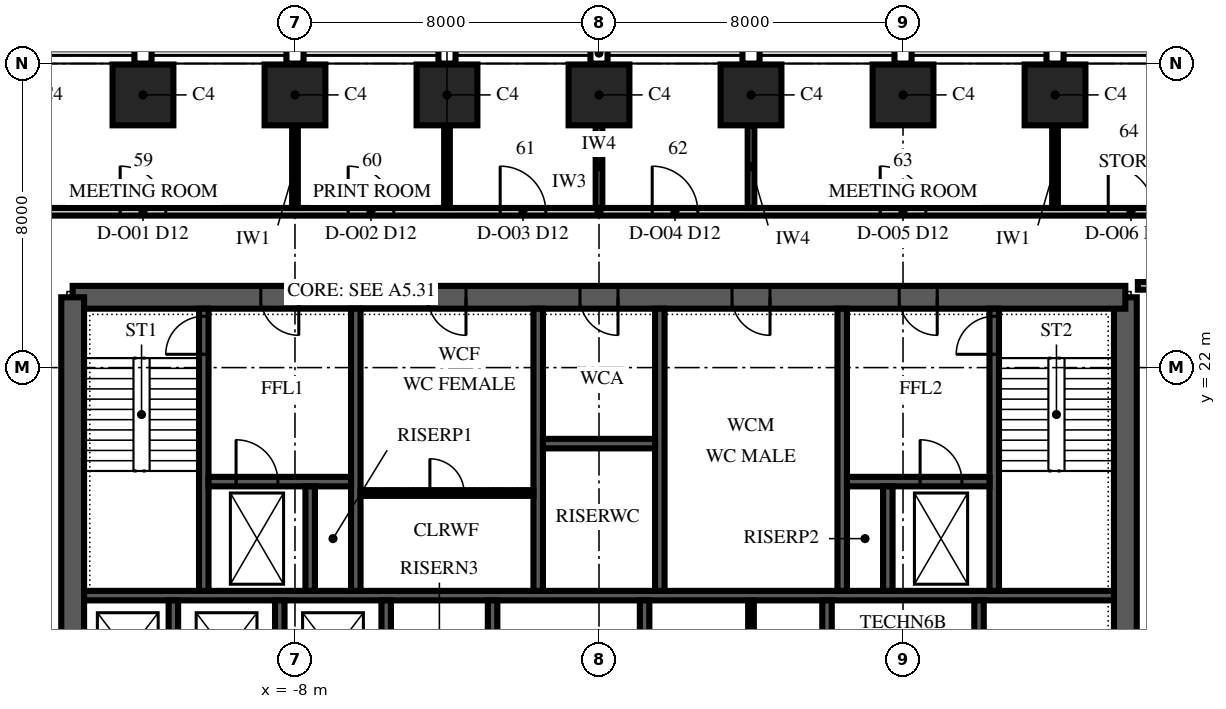
"""IFC4 building model, lengths in metres.
Left out: names, types, materials, properties, quantities, classifications, styles, units other than length and angle.
Written with IfcOpenShell. Run it as: python <this file> out.ifc"""

import sys

from ifc_helpers import new_model, si_unit, direction, frame, frame_2d, origin, origin_2d, place, context, subcontext, project, spatial, polyline, rectangle, outline, extrude, element, fill, save


model = new_model("IFC4")
c1 = context("Model", 3, precision=1e-05, world=origin(), true_north=direction((0.0, 1.0)))
c2 = subcontext(c1, "Body", "Model", "MODEL_VIEW")
j1 = project(units=[si_unit("LENGTHUNIT", "METRE"), si_unit("PLANEANGLEUNIT", "RADIAN")], contexts=[c1])
p1 = place(None, origin())
s1 = spatial("IfcSite", under=j1, at=p1, CompositionType="ELEMENT")
p2 = place(p1, origin())
s2 = spatial("IfcBuilding", under=s1, at=p2, CompositionType="ELEMENT")
p3 = place(p2, frame((0.0, 0.0, 226.0)))
s3 = spatial("IfcBuildingStorey", under=s2, at=p3, CompositionType="ELEMENT", Elevation=226.0)
for number, where, z_axis, x_axis in (
    (1, (12.0, 29.175, 0.0), (0.0, 0.0, 1.0), (-1.0, 0.0, 0.0)),
    (2, (8.0, 29.175, 0.0), (0.0, 0.0, 1.0), (-1.0, 0.0, 0.0)),
    (3, (4.0, 29.175, 0.0), (0.0, 0.0, 1.0), (-1.0, 0.0, 0.0)),
    (4, (0.0, 29.175, 0.0), (0.0, 0.0, 1.0), (-1.0, 0.0, 0.0)),
    (5, (-4.0, 29.175, 0.0), (0.0, 0.0, 1.0), (-1.0, 0.0, 0.0)),
    (6, (-8.0, 29.175, 0.0), (0.0, 0.0, 1.0), (-1.0, 0.0, 0.0)),
    (7, (-12.0, 29.175, 0.0), (0.0, 0.0, 1.0), (-1.0, 0.0, 0.0)),
):
    element("IfcColumn", number, at=place(p3, frame(where, z_axis=z_axis, x_axis=x_axis)), inside=s3, PredefinedType="COLUMN", context=c2, shape_type="SweptSolid", body=[
        extrude(rectangle(XDim=1.6, YDim=1.6, at=origin_2d()), origin(), (0.0, 0.0, 1.0), 4.0),
    ])
p4 = place(p3, frame((13.85, 6.15, 0.0), z_axis=(0.0, 0.0, 1.0), x_axis=(0.0, 1.0, 0.0)))
e8 = element("IfcWall", 8, at=p4, inside=s3, PredefinedType="SHEAR", context=c2, shape_type="SweptSolid", body=[
    extrude(outline(polyline([(0.0, -0.3), (17.7, -0.3), (17.7, 0.0), (17.4, 0.0), (17.4, 0.3), (0.3, 0.3), (0.3, 0.0), (0.0, 0.0), (0.0, -0.3)])), origin(), (0.0, 0.0, 1.0), 4.0),
])
p5 = place(p4, frame((4.15, 0.0, 0.0)))
e9 = element("IfcOpeningElement", 9, at=p5, cuts=e8, PredefinedType="OPENING", context=c2, shape_type="SweptSolid", body=[
    extrude(rectangle(XDim=1.8, YDim=2.4, at=frame_2d((0.9, 1.2))), frame((0.0, 0.315, 0.0), z_axis=(0.0, -1.0, 0.0), x_axis=(1.0, 0.0, 0.0)), (0.0, 0.0, 1.0), 0.63),
])
p6 = place(p3, frame((13.85, 23.85, 0.0), z_axis=(0.0, 0.0, 1.0), x_axis=(-1.0, 0.0, 0.0)))
e10 = element("IfcWall", 10, at=p6, inside=s3, PredefinedType="SHEAR", context=c2, shape_type="SweptSolid", body=[
    extrude(rectangle(XDim=27.7, YDim=0.6, at=frame_2d((13.85, 0.0))), origin(), (0.0, 0.0, 1.0), 4.0),
])
p7 = place(p6, frame((21.75, 0.0, 0.0)))
e11 = element("IfcOpeningElement", 11, at=p7, cuts=e10, PredefinedType="OPENING", context=c2, shape_type="SweptSolid", body=[
    extrude(rectangle(XDim=1.0, YDim=2.1, at=frame_2d((0.5, 1.05))), frame((0.0, 0.315, 0.0), z_axis=(0.0, -1.0, 0.0), x_axis=(1.0, 0.0, 0.0)), (0.0, 0.0, 1.0), 0.63),
])
p8 = place(p6, frame((4.95, 0.0, 0.0)))
e12 = element("IfcOpeningElement", 12, at=p8, cuts=e10, PredefinedType="OPENING", context=c2, shape_type="SweptSolid", body=[
    extrude(rectangle(XDim=1.0, YDim=2.1, at=frame_2d((0.5, 1.05))), frame((0.0, 0.315, 0.0), z_axis=(0.0, -1.0, 0.0), x_axis=(1.0, 0.0, 0.0)), (0.0, 0.0, 1.0), 0.63),
])
p9 = place(p6, frame((17.35, 0.0, 0.0)))
e13 = element("IfcOpeningElement", 13, at=p9, cuts=e10, PredefinedType="OPENING", context=c2, shape_type="SweptSolid", body=[
    extrude(rectangle(XDim=1.0, YDim=2.1, at=frame_2d((0.5, 1.05))), frame((0.0, 0.315, 0.0), z_axis=(0.0, -1.0, 0.0), x_axis=(1.0, 0.0, 0.0)), (0.0, 0.0, 1.0), 0.63),
])
p10 = place(p6, frame((13.35, 0.0, 0.0)))
e14 = element("IfcOpeningElement", 14, at=p10, cuts=e10, PredefinedType="OPENING", context=c2, shape_type="SweptSolid", body=[
    extrude(rectangle(XDim=1.0, YDim=2.1, at=frame_2d((0.5, 1.05))), frame((0.0, 0.315, 0.0), z_axis=(0.0, -1.0, 0.0), x_axis=(1.0, 0.0, 0.0)), (0.0, 0.0, 1.0), 0.63),
])
p11 = place(p6, frame((9.35, 0.0, 0.0)))
e15 = element("IfcOpeningElement", 15, at=p11, cuts=e10, PredefinedType="OPENING", context=c2, shape_type="SweptSolid", body=[
    extrude(rectangle(XDim=1.0, YDim=2.1, at=frame_2d((0.5, 1.05))), frame((0.0, 0.315, 0.0), z_axis=(0.0, -1.0, 0.0), x_axis=(1.0, 0.0, 0.0)), (0.0, 0.0, 1.0), 0.63),
])
p12 = place(p3, frame((-13.85, 23.85, 0.0), z_axis=(0.0, 0.0, 1.0), x_axis=(0.0, -1.0, 0.0)))
e16 = element("IfcWall", 16, at=p12, inside=s3, PredefinedType="SHEAR", context=c2, shape_type="SweptSolid", body=[
    extrude(outline(polyline([(0.0, -0.3), (17.7, -0.3), (17.7, 0.0), (17.4, 0.0), (17.4, 0.3), (0.3, 0.3), (0.3, 0.0), (0.0, 0.0), (0.0, -0.3)])), origin(), (0.0, 0.0, 1.0), 4.0),
])
p13 = place(p12, frame((11.75, 0.0, 0.0)))
e17 = element("IfcOpeningElement", 17, at=p13, cuts=e16, PredefinedType="OPENING", context=c2, shape_type="SweptSolid", body=[
    extrude(rectangle(XDim=1.8, YDim=2.4, at=frame_2d((0.9, 1.2))), frame((0.0, 0.315, 0.0), z_axis=(0.0, -1.0, 0.0), x_axis=(1.0, 0.0, 0.0)), (0.0, 0.0, 1.0), 0.63),
])
p14 = place(p3, frame((-13.55, 16.0, 0.0), z_axis=(0.0, 0.0, 1.0), x_axis=(1.0, 0.0, 0.0)))
e18 = element("IfcWall", 18, at=p14, inside=s3, PredefinedType="SHEAR", context=c2, shape_type="SweptSolid", body=[
    extrude(rectangle(XDim=27.1, YDim=0.25, at=frame_2d((13.55, 0.0))), origin(), (0.0, 0.0, 1.0), 4.0),
])
for number, where, z_axis, x_axis in (
    (19, (-11.2, 13.125, 0.0), (0.0, 0.0, 1.0), (0.0, 1.0, 0.0)),
    (20, (-8.4, 13.125, 0.0), (0.0, 0.0, 1.0), (0.0, 1.0, 0.0)),
    (21, (-5.6, 13.125, 0.0), (0.0, 0.0, 1.0), (0.0, 1.0, 0.0)),
    (22, (-2.8, 13.125, 0.0), (0.0, 0.0, 1.0), (0.0, 1.0, 0.0)),
    (23, (1.2, 13.125, 0.0), (0.0, 0.0, 1.0), (0.0, 1.0, 0.0)),
    (24, (6.0, 13.125, 0.0), (0.0, 0.0, 1.0), (0.0, 1.0, 0.0)),
    (25, (10.0, 13.125, 0.0), (0.0, 0.0, 1.0), (0.0, 1.0, 0.0)),
):
    element("IfcWall", number, at=place(p3, frame(where, z_axis=z_axis, x_axis=x_axis)), inside=s3, PredefinedType="SHEAR", context=c2, shape_type="SweptSolid", body=[
        extrude(rectangle(XDim=2.75, YDim=0.25, at=frame_2d((1.375, 0.0))), origin(), (0.0, 0.0, 1.0), 4.0),
    ])
p15 = place(p3, frame((-10.4, 16.125, 0.0), z_axis=(0.0, 0.0, 1.0), x_axis=(0.0, 1.0, 0.0)))
e26 = element("IfcWall", 26, at=p15, inside=s3, PredefinedType="SHEAR", context=c2, shape_type="SweptSolid", body=[
    extrude(rectangle(XDim=7.425, YDim=0.25, at=frame_2d((3.712, 0.0))), origin(), (0.0, 0.0, 1.0), 4.0),
])
p16 = place(p15, frame((6.225, 0.0, 0.0)))
e27 = element("IfcOpeningElement", 27, at=p16, cuts=e26, PredefinedType="OPENING", context=c2, shape_type="SweptSolid", body=[
    extrude(rectangle(XDim=1.0, YDim=2.1, at=frame_2d((0.5, 1.05))), frame((0.0, 0.14, 0.0), z_axis=(0.0, -1.0, 0.0), x_axis=(1.0, 0.0, 0.0)), (0.0, 0.0, 1.0), 0.28),
])
for number, where, z_axis, x_axis in (
    (28, (-6.4, 16.125, 0.0), (0.0, 0.0, 1.0), (0.0, 1.0, 0.0)),
    (29, (-1.6, 16.125, 0.0), (0.0, 0.0, 1.0), (0.0, 1.0, 0.0)),
    (30, (1.6, 16.125, 0.0), (0.0, 0.0, 1.0), (0.0, 1.0, 0.0)),
    (31, (6.4, 16.125, 0.0), (0.0, 0.0, 1.0), (0.0, 1.0, 0.0)),
):
    element("IfcWall", number, at=place(p3, frame(where, z_axis=z_axis, x_axis=x_axis)), inside=s3, PredefinedType="SHEAR", context=c2, shape_type="SweptSolid", body=[
        extrude(rectangle(XDim=7.425, YDim=0.25, at=frame_2d((3.712, 0.0))), origin(), (0.0, 0.0, 1.0), 4.0),
    ])
p17 = place(p3, frame((10.4, 16.125, 0.0), z_axis=(0.0, 0.0, 1.0), x_axis=(0.0, 1.0, 0.0)))
e32 = element("IfcWall", 32, at=p17, inside=s3, PredefinedType="SHEAR", context=c2, shape_type="SweptSolid", body=[
    extrude(rectangle(XDim=7.425, YDim=0.25, at=frame_2d((3.712, 0.0))), origin(), (0.0, 0.0, 1.0), 4.0),
])
p18 = place(p17, frame((6.225, 0.0, 0.0)))
e33 = element("IfcOpeningElement", 33, at=p18, cuts=e32, PredefinedType="OPENING", context=c2, shape_type="SweptSolid", body=[
    extrude(rectangle(XDim=1.0, YDim=2.1, at=frame_2d((0.5, 1.05))), frame((0.0, 0.14, 0.0), z_axis=(0.0, -1.0, 0.0), x_axis=(1.0, 0.0, 0.0)), (0.0, 0.0, 1.0), 0.28),
])
p19 = place(p3, frame((-10.275, 19.0, 0.0), z_axis=(0.0, 0.0, 1.0), x_axis=(1.0, 0.0, 0.0)))
e34 = element("IfcWall", 34, at=p19, inside=s3, PredefinedType="SHEAR", context=c2, shape_type="SweptSolid", body=[
    extrude(rectangle(XDim=3.75, YDim=0.25, at=frame_2d((1.875, 0.0))), origin(), (0.0, 0.0, 1.0), 4.0),
])
p20 = place(p19, frame((0.725, 0.0, 0.0)))
e35 = element("IfcOpeningElement", 35, at=p20, cuts=e34, PredefinedType="OPENING", context=c2, shape_type="SweptSolid", body=[
    extrude(rectangle(XDim=1.1, YDim=2.1, at=frame_2d((0.55, 1.05))), frame((0.0, 0.14, 0.0), z_axis=(0.0, -1.0, 0.0), x_axis=(1.0, 0.0, 0.0)), (0.0, 0.0, 1.0), 0.28),
])
p21 = place(p3, frame((6.525, 19.0, 0.0), z_axis=(0.0, 0.0, 1.0), x_axis=(1.0, 0.0, 0.0)))
e36 = element("IfcWall", 36, at=p21, inside=s3, PredefinedType="SHEAR", context=c2, shape_type="SweptSolid", body=[
    extrude(rectangle(XDim=3.75, YDim=0.25, at=frame_2d((1.875, 0.0))), origin(), (0.0, 0.0, 1.0), 4.0),
])
p22 = place(p21, frame((1.925, 0.0, 0.0)))
e37 = element("IfcOpeningElement", 37, at=p22, cuts=e36, PredefinedType="OPENING", context=c2, shape_type="SweptSolid", body=[
    extrude(rectangle(XDim=1.1, YDim=2.1, at=frame_2d((0.55, 1.05))), frame((0.0, 0.14, 0.0), z_axis=(0.0, -1.0, 0.0), x_axis=(1.0, 0.0, 0.0)), (0.0, 0.0, 1.0), 0.28),
])
for number, where, z_axis, x_axis in (
    (38, (-7.6, 16.125, 0.0), (0.0, 0.0, 1.0), (0.0, 1.0, 0.0)),
    (39, (7.6, 16.125, 0.0), (0.0, 0.0, 1.0), (0.0, 1.0, 0.0)),
):
    element("IfcWall", number, at=place(p3, frame(where, z_axis=z_axis, x_axis=x_axis)), inside=s3, PredefinedType="SHEAR", context=c2, shape_type="SweptSolid", body=[
        extrude(rectangle(XDim=2.75, YDim=0.25, at=frame_2d((1.375, 0.0))), origin(), (0.0, 0.0, 1.0), 4.0),
    ])
p23 = place(p3, frame((-1.475, 20.0, 0.0), z_axis=(0.0, 0.0, 1.0), x_axis=(1.0, 0.0, 0.0)))
e40 = element("IfcWall", 40, at=p23, inside=s3, PredefinedType="SHEAR", context=c2, shape_type="SweptSolid", body=[
    extrude(rectangle(XDim=2.95, YDim=0.25, at=frame_2d((1.475, 0.0))), origin(), (0.0, 0.0, 1.0), 4.0),
])
p24 = place(p3, frame((-6.275, 18.7, 0.0), z_axis=(0.0, 0.0, 1.0), x_axis=(1.0, 0.0, 0.0)))
e41 = element("IfcWall", 41, at=p24, inside=s3, PredefinedType="PARTITIONING", context=c2, shape_type="SweptSolid", body=[
    extrude(rectangle(XDim=4.55, YDim=0.15, at=frame_2d((2.275, 0.0))), origin(), (0.0, 0.0, 1.0), 3.85),
])
p25 = place(p24, frame((1.825, 0.0, 0.0)))
e42 = element("IfcOpeningElement", 42, at=p25, cuts=e41, PredefinedType="OPENING", context=c2, shape_type="SweptSolid", body=[
    extrude(rectangle(XDim=0.9, YDim=2.1, at=frame_2d((0.45, 1.05))), frame((0.0, 0.09, 0.0), z_axis=(0.0, -1.0, 0.0), x_axis=(1.0, 0.0, 0.0)), (0.0, 0.0, 1.0), 0.18),
])
p26 = place(p3, frame((4.0, 13.125, 0.0), z_axis=(0.0, 0.0, 1.0), x_axis=(0.0, 1.0, 0.0)))
e43 = element("IfcWall", 43, at=p26, inside=s3, PredefinedType="PARTITIONING", context=c2, shape_type="SweptSolid", body=[
    extrude(rectangle(XDim=2.75, YDim=0.15, at=frame_2d((1.375, 0.0))), origin(), (0.0, 0.0, 1.0), 3.85),
])
p27 = place(p3, frame((14.18, 24.15, 0.0), z_axis=(0.0, 0.0, 1.0), x_axis=(1.0, 0.0, 0.0)))
e44 = element("IfcWall", 44, at=p27, inside=s3, PredefinedType="PARTITIONING", context=c2, shape_type="SweptSolid", body=[
    extrude(rectangle(XDim=2.02, YDim=0.2, at=frame_2d((1.01, 0.0))), origin(), (0.0, 0.0, 1.0), 3.4),
])
p28 = place(p3, frame((-16.2, 26.1, 0.0), z_axis=(0.0, 0.0, 1.0), x_axis=(1.0, 0.0, 0.0)))
e45 = element("IfcWall", 45, at=p28, inside=s3, PredefinedType="PARTITIONING", context=c2, shape_type="SweptSolid", body=[
    extrude(rectangle(XDim=32.4, YDim=0.2, at=frame_2d((16.2, 0.0))), origin(), (0.0, 0.0, 1.0), 3.4),
])
p29 = place(p28, frame((3.6, 0.0, 0.0)))
e46 = element("IfcOpeningElement", 46, at=p29, cuts=e45, PredefinedType="OPENING", context=c2, shape_type="SweptSolid", body=[
    extrude(rectangle(XDim=1.2, YDim=2.4, at=frame_2d((0.6, 1.2))), frame((0.0, 0.115, 0.0), z_axis=(0.0, -1.0, 0.0), x_axis=(1.0, 0.0, 0.0)), (0.0, 0.0, 1.0), 0.23),
])
p30 = place(p28, frame((9.6, 0.0, 0.0)))
e47 = element("IfcOpeningElement", 47, at=p30, cuts=e45, PredefinedType="OPENING", context=c2, shape_type="SweptSolid", body=[
    extrude(rectangle(XDim=1.2, YDim=2.4, at=frame_2d((0.6, 1.2))), frame((0.0, 0.115, 0.0), z_axis=(0.0, -1.0, 0.0), x_axis=(1.0, 0.0, 0.0)), (0.0, 0.0, 1.0), 0.23),
])
p31 = place(p28, frame((13.6, 0.0, 0.0)))
e48 = element("IfcOpeningElement", 48, at=p31, cuts=e45, PredefinedType="OPENING", context=c2, shape_type="SweptSolid", body=[
    extrude(rectangle(XDim=1.2, YDim=2.4, at=frame_2d((0.6, 1.2))), frame((0.0, 0.115, 0.0), z_axis=(0.0, -1.0, 0.0), x_axis=(1.0, 0.0, 0.0)), (0.0, 0.0, 1.0), 0.23),
])
p32 = place(p28, frame((17.6, 0.0, 0.0)))
e49 = element("IfcOpeningElement", 49, at=p32, cuts=e45, PredefinedType="OPENING", context=c2, shape_type="SweptSolid", body=[
    extrude(rectangle(XDim=1.2, YDim=2.4, at=frame_2d((0.6, 1.2))), frame((0.0, 0.115, 0.0), z_axis=(0.0, -1.0, 0.0), x_axis=(1.0, 0.0, 0.0)), (0.0, 0.0, 1.0), 0.23),
])
p33 = place(p28, frame((23.6, 0.0, 0.0)))
e50 = element("IfcOpeningElement", 50, at=p33, cuts=e45, PredefinedType="OPENING", context=c2, shape_type="SweptSolid", body=[
    extrude(rectangle(XDim=1.2, YDim=2.4, at=frame_2d((0.6, 1.2))), frame((0.0, 0.115, 0.0), z_axis=(0.0, -1.0, 0.0), x_axis=(1.0, 0.0, 0.0)), (0.0, 0.0, 1.0), 0.23),
])
p34 = place(p28, frame((29.6, 0.0, 0.0)))
e51 = element("IfcOpeningElement", 51, at=p34, cuts=e45, PredefinedType="OPENING", context=c2, shape_type="SweptSolid", body=[
    extrude(rectangle(XDim=1.2, YDim=2.4, at=frame_2d((0.6, 1.2))), frame((0.0, 0.115, 0.0), z_axis=(0.0, -1.0, 0.0), x_axis=(1.0, 0.0, 0.0)), (0.0, 0.0, 1.0), 0.23),
])
p35 = place(p3, frame((-8.0, 26.2, 0.0), z_axis=(0.0, 0.0, 1.0), x_axis=(0.0, 1.0, 0.0)))
e52 = element("IfcWall", 52, at=p35, inside=s3, PredefinedType="PARTITIONING", context=c2, shape_type="SweptSolid", body=[
    extrude(rectangle(XDim=2.175, YDim=0.15, at=frame_2d((1.087, 0.0))), origin(), (0.0, 0.0, 1.0), 3.4),
])
p36 = place(p3, frame((-4.0, 26.2, 0.0), z_axis=(0.0, 0.0, 1.0), x_axis=(0.0, 1.0, 0.0)))
e53 = element("IfcWall", 53, at=p36, inside=s3, PredefinedType="PARTITIONING", context=c2, shape_type="SweptSolid", body=[
    extrude(rectangle(XDim=2.175, YDim=0.15, at=frame_2d((1.087, 0.0))), origin(), (0.0, 0.0, 1.0), 3.85),
])
for number, where, z_axis, x_axis in (
    (54, (0.0, 26.2, 0.0), (0.0, 0.0, 1.0), (0.0, 1.0, 0.0)),
    (55, (4.0, 26.2, 0.0), (0.0, 0.0, 1.0), (0.0, 1.0, 0.0)),
):
    element("IfcWall", number, at=place(p3, frame(where, z_axis=z_axis, x_axis=x_axis)), inside=s3, PredefinedType="PARTITIONING", context=c2, shape_type="SweptSolid", body=[
        extrude(rectangle(XDim=2.175, YDim=0.175, at=frame_2d((1.087, 0.0))), origin(), (0.0, 0.0, 1.0), 3.4),
    ])
p37 = place(p3, frame((12.0, 26.2, 0.0), z_axis=(0.0, 0.0, 1.0), x_axis=(0.0, 1.0, 0.0)))
e56 = element("IfcWall", 56, at=p37, inside=s3, PredefinedType="PARTITIONING", context=c2, shape_type="SweptSolid", body=[
    extrude(rectangle(XDim=2.175, YDim=0.15, at=frame_2d((1.087, 0.0))), origin(), (0.0, 0.0, 1.0), 3.4),
])
p38 = place(p7, origin())
e57 = element("IfcDoor", 57, at=p38, inside=s3, OperationType="SINGLE_SWING_RIGHT", PredefinedType="DOOR", context=c2, shape_type="SweptSolid", body=[
    extrude(rectangle(XDim=1.0, YDim=2.1, at=frame_2d((0.5, 1.05))), frame((0.0, 0.3, 0.0), z_axis=(0.0, -1.0, 0.0), x_axis=(1.0, 0.0, 0.0)), (0.0, 0.0, 1.0), 0.6),
])
fill(e11, e57)
p39 = place(p8, origin())
e58 = element("IfcDoor", 58, at=p39, inside=s3, OperationType="SINGLE_SWING_RIGHT", PredefinedType="DOOR", context=c2, shape_type="SweptSolid", body=[
    extrude(rectangle(XDim=1.0, YDim=2.1, at=frame_2d((0.5, 1.05))), frame((0.0, 0.3, 0.0), z_axis=(0.0, -1.0, 0.0), x_axis=(1.0, 0.0, 0.0)), (0.0, 0.0, 1.0), 0.6),
])
fill(e12, e58)
p40 = place(p9, origin())
e59 = element("IfcDoor", 59, at=p40, inside=s3, OperationType="SINGLE_SWING_LEFT", PredefinedType="DOOR", context=c2, shape_type="SweptSolid", body=[
    extrude(rectangle(XDim=1.0, YDim=2.1, at=frame_2d((0.5, 1.05))), frame((0.0, 0.3, 0.0), z_axis=(0.0, -1.0, 0.0), x_axis=(1.0, 0.0, 0.0)), (0.0, 0.0, 1.0), 0.6),
])
fill(e13, e59)
p41 = place(p10, origin())
e60 = element("IfcDoor", 60, at=p41, inside=s3, OperationType="SINGLE_SWING_LEFT", PredefinedType="DOOR", context=c2, shape_type="SweptSolid", body=[
    extrude(rectangle(XDim=1.0, YDim=2.1, at=frame_2d((0.5, 1.05))), frame((0.0, 0.3, 0.0), z_axis=(0.0, -1.0, 0.0), x_axis=(1.0, 0.0, 0.0)), (0.0, 0.0, 1.0), 0.6),
])
fill(e14, e60)
p42 = place(p11, origin())
e61 = element("IfcDoor", 61, at=p42, inside=s3, OperationType="SINGLE_SWING_LEFT", PredefinedType="DOOR", context=c2, shape_type="SweptSolid", body=[
    extrude(rectangle(XDim=1.0, YDim=2.1, at=frame_2d((0.5, 1.05))), frame((0.0, 0.3, 0.0), z_axis=(0.0, -1.0, 0.0), x_axis=(1.0, 0.0, 0.0)), (0.0, 0.0, 1.0), 0.6),
])
fill(e15, e61)
p43 = place(p16, origin())
e62 = element("IfcDoor", 62, at=p43, inside=s3, OperationType="SINGLE_SWING_LEFT", PredefinedType="DOOR", context=c2, shape_type="SweptSolid", body=[
    extrude(rectangle(XDim=1.0, YDim=2.1, at=frame_2d((0.5, 1.05))), frame((0.0, 0.125, 0.0), z_axis=(0.0, -1.0, 0.0), x_axis=(1.0, 0.0, 0.0)), (0.0, 0.0, 1.0), 0.25),
])
fill(e27, e62)
p44 = place(p18, origin())
e63 = element("IfcDoor", 63, at=p44, inside=s3, OperationType="SINGLE_SWING_LEFT", PredefinedType="DOOR", context=c2, shape_type="SweptSolid", body=[
    extrude(rectangle(XDim=1.0, YDim=2.1, at=frame_2d((0.5, 1.05))), frame((0.0, 0.125, 0.0), z_axis=(0.0, -1.0, 0.0), x_axis=(1.0, 0.0, 0.0)), (0.0, 0.0, 1.0), 0.25),
])
fill(e33, e63)
p45 = place(p22, origin())
e64 = element("IfcDoor", 64, at=p45, inside=s3, OperationType="SLIDING_TO_RIGHT", PredefinedType="DOOR", context=c2, shape_type="SweptSolid", body=[
    extrude(rectangle(XDim=1.1, YDim=2.1, at=frame_2d((0.55, 1.05))), frame((0.0, 0.125, 0.0), z_axis=(0.0, -1.0, 0.0), x_axis=(1.0, 0.0, 0.0)), (0.0, 0.0, 1.0), 0.25),
])
fill(e37, e64)
p46 = place(p20, origin())
e65 = element("IfcDoor", 65, at=p46, inside=s3, OperationType="SLIDING_TO_RIGHT", PredefinedType="DOOR", context=c2, shape_type="SweptSolid", body=[
    extrude(rectangle(XDim=1.1, YDim=2.1, at=frame_2d((0.55, 1.05))), frame((0.0, 0.125, 0.0), z_axis=(0.0, -1.0, 0.0), x_axis=(1.0, 0.0, 0.0)), (0.0, 0.0, 1.0), 0.25),
])
fill(e35, e65)
p47 = place(p25, origin())
e66 = element("IfcDoor", 66, at=p47, inside=s3, OperationType="SINGLE_SWING_LEFT", PredefinedType="DOOR", context=c2, shape_type="SweptSolid", body=[
    extrude(rectangle(XDim=0.9, YDim=2.1, at=frame_2d((0.45, 1.05))), frame((0.0, 0.075, 0.0), z_axis=(0.0, -1.0, 0.0), x_axis=(1.0, 0.0, 0.0)), (0.0, 0.0, 1.0), 0.149),
])
fill(e42, e66)
p48 = place(p29, origin())
e67 = element("IfcDoor", 67, at=p48, inside=s3, OperationType="SINGLE_SWING_LEFT", PredefinedType="DOOR", context=c2, shape_type="SweptSolid", body=[
    extrude(rectangle(XDim=1.2, YDim=2.4, at=frame_2d((0.6, 1.2))), frame((0.0, 0.1, 0.0), z_axis=(0.0, -1.0, 0.0), x_axis=(1.0, 0.0, 0.0)), (0.0, 0.0, 1.0), 0.199),
])
fill(e46, e67)
p49 = place(p30, origin())
e68 = element("IfcDoor", 68, at=p49, inside=s3, OperationType="SINGLE_SWING_LEFT", PredefinedType="DOOR", context=c2, shape_type="SweptSolid", body=[
    extrude(rectangle(XDim=1.2, YDim=2.4, at=frame_2d((0.6, 1.2))), frame((0.0, 0.1, 0.0), z_axis=(0.0, -1.0, 0.0), x_axis=(1.0, 0.0, 0.0)), (0.0, 0.0, 1.0), 0.199),
])
fill(e47, e68)
p50 = place(p31, origin())
e69 = element("IfcDoor", 69, at=p50, inside=s3, OperationType="SINGLE_SWING_LEFT", PredefinedType="DOOR", context=c2, shape_type="SweptSolid", body=[
    extrude(rectangle(XDim=1.2, YDim=2.4, at=frame_2d((0.6, 1.2))), frame((0.0, 0.1, 0.0), z_axis=(0.0, -1.0, 0.0), x_axis=(1.0, 0.0, 0.0)), (0.0, 0.0, 1.0), 0.199),
])
fill(e48, e69)
p51 = place(p32, origin())
e70 = element("IfcDoor", 70, at=p51, inside=s3, OperationType="SINGLE_SWING_LEFT", PredefinedType="DOOR", context=c2, shape_type="SweptSolid", body=[
    extrude(rectangle(XDim=1.2, YDim=2.4, at=frame_2d((0.6, 1.2))), frame((0.0, 0.1, 0.0), z_axis=(0.0, -1.0, 0.0), x_axis=(1.0, 0.0, 0.0)), (0.0, 0.0, 1.0), 0.199),
])
fill(e49, e70)
p52 = place(p33, origin())
e71 = element("IfcDoor", 71, at=p52, inside=s3, OperationType="SINGLE_SWING_LEFT", PredefinedType="DOOR", context=c2, shape_type="SweptSolid", body=[
    extrude(rectangle(XDim=1.2, YDim=2.4, at=frame_2d((0.6, 1.2))), frame((0.0, 0.1, 0.0), z_axis=(0.0, -1.0, 0.0), x_axis=(1.0, 0.0, 0.0)), (0.0, 0.0, 1.0), 0.199),
])
fill(e50, e71)
p53 = place(p34, origin())
e72 = element("IfcDoor", 72, at=p53, inside=s3, OperationType="SINGLE_SWING_LEFT", PredefinedType="DOOR", context=c2, shape_type="SweptSolid", body=[
    extrude(rectangle(XDim=1.2, YDim=2.4, at=frame_2d((0.6, 1.2))), frame((0.0, 0.1, 0.0), z_axis=(0.0, -1.0, 0.0), x_axis=(1.0, 0.0, 0.0)), (0.0, 0.0, 1.0), 0.199),
])
fill(e51, e72)
save(model, sys.argv[1])
